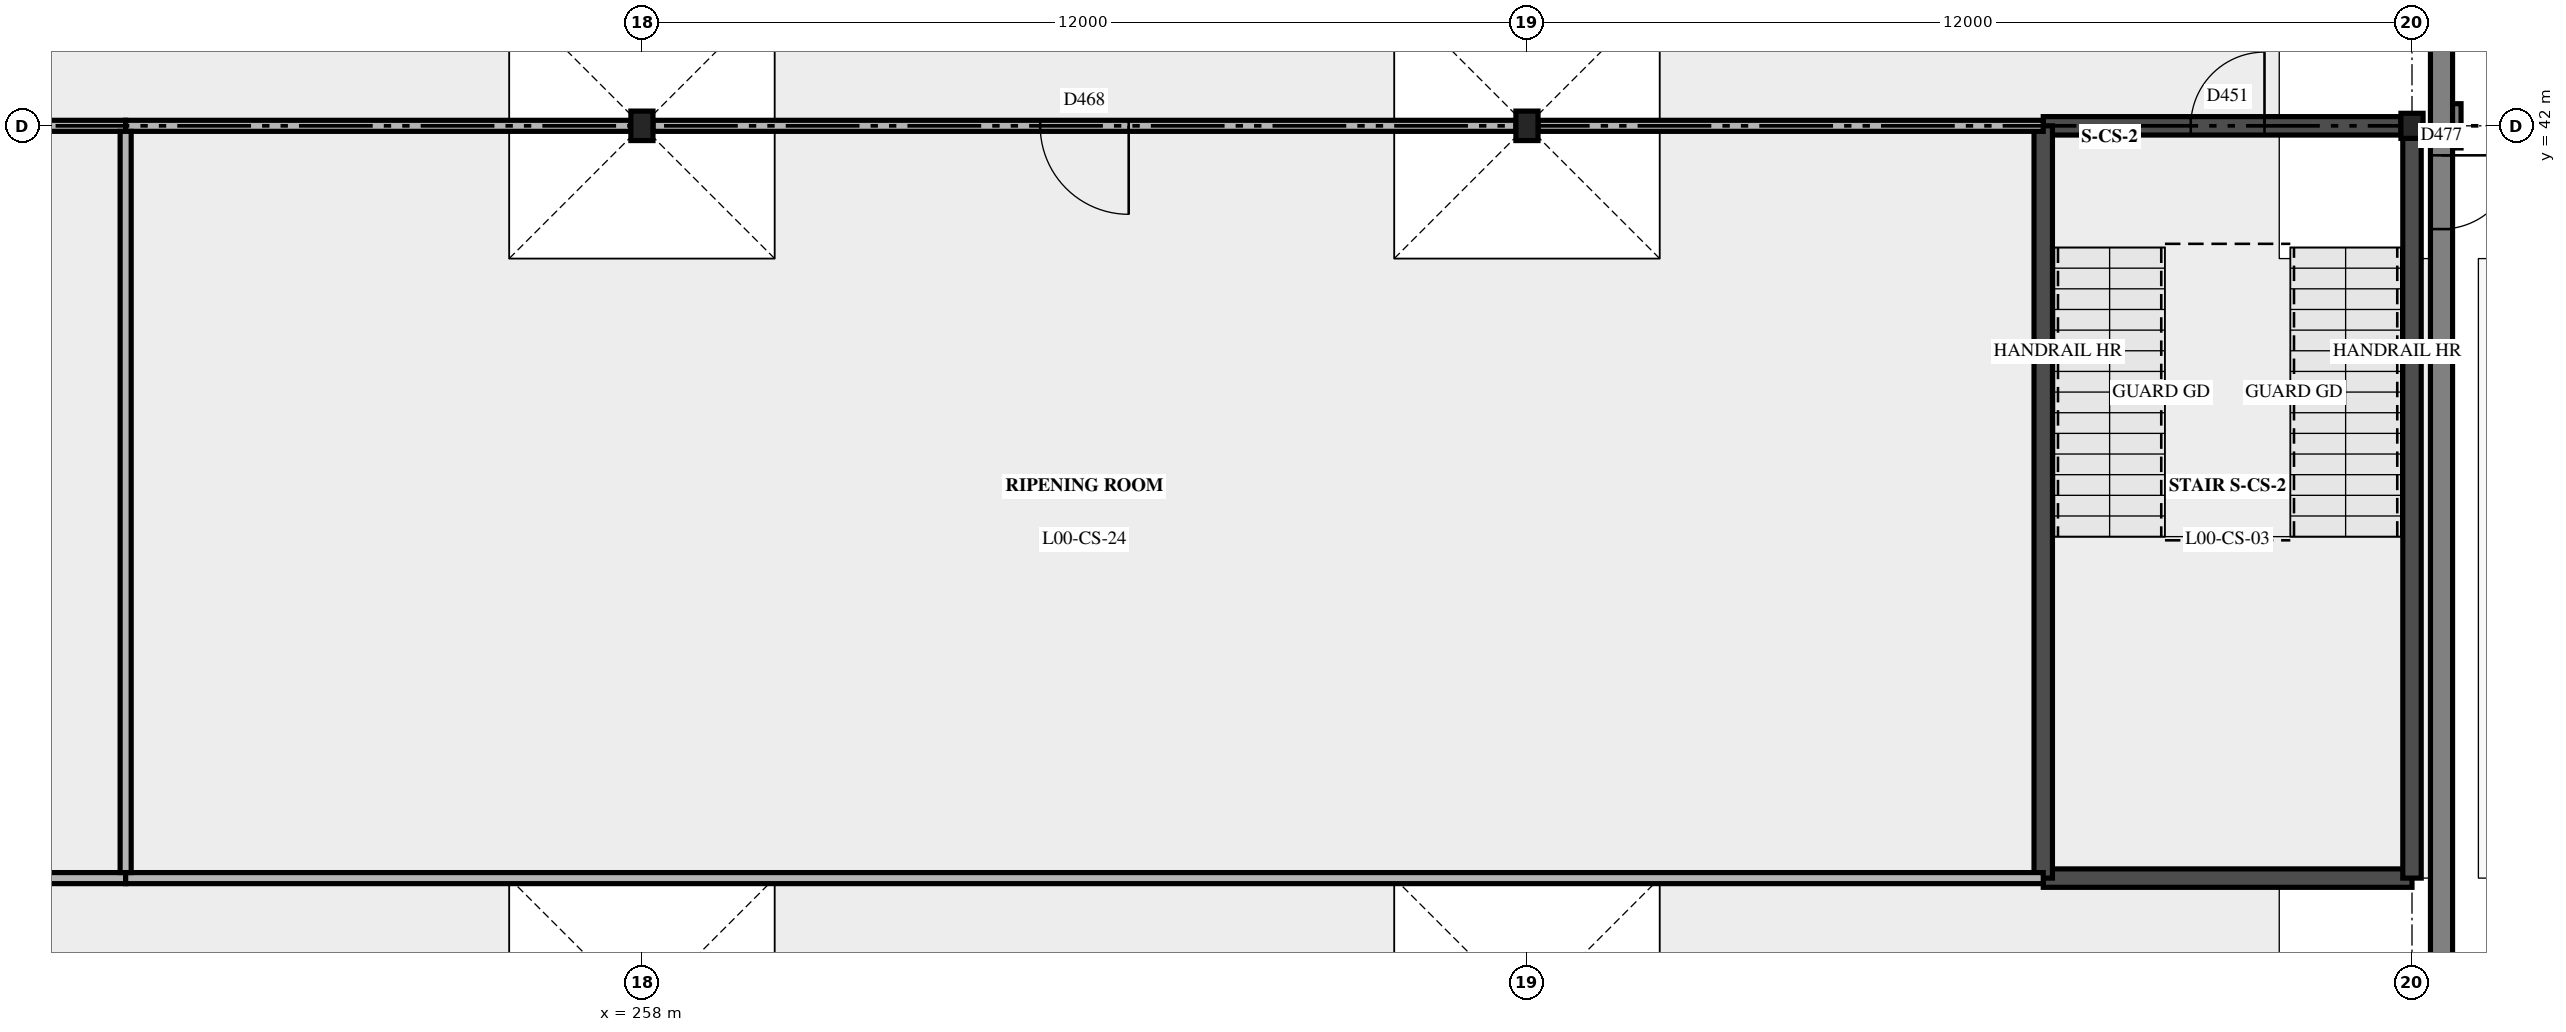
"""IFC4 building model, lengths in metres.
Left out: names, types, materials, properties, quantities, classifications, styles, units other than length and angle.
Written with IfcOpenShell. Run it as: python <this file> out.ifc"""

import sys

from ifc_helpers import new_model, si_unit, direction, frame, frame_2d, origin, origin_2d, place, context, subcontext, project, spatial, polyline, rectangle, i_section, outline, extrude, element, fill, save


model = new_model("IFC4")
c1 = context("Model", 3, precision=1e-05, world=origin(), true_north=direction((0.0, 1.0)))
c2 = subcontext(c1, "Body", "Model", "MODEL_VIEW")
j1 = project(units=[si_unit("LENGTHUNIT", "METRE"), si_unit("PLANEANGLEUNIT", "RADIAN")], contexts=[c1])
p1 = place(None, origin())
s1 = spatial("IfcSite", under=j1, at=p1, CompositionType="ELEMENT")
p2 = place(p1, origin())
s2 = spatial("IfcBuilding", under=s1, at=p2, CompositionType="ELEMENT")
p3 = place(p2, origin())
s3 = spatial("IfcBuildingStorey", under=s2, at=p3, CompositionType="ELEMENT", Elevation=0.0)
for number, where, z_axis, x_axis in (
    (1, (258.0, 42.0, 0.0), (0.0, 0.0, 1.0), (1.0, 0.0, 0.0)),
    (2, (270.0, 42.0, 0.0), (0.0, 0.0, 1.0), (1.0, 0.0, 0.0)),
):
    element("IfcColumn", number, at=place(p3, frame(where, z_axis=z_axis, x_axis=x_axis)), inside=s3, PredefinedType="COLUMN", context=c2, shape_type="SweptSolid", body=[
        extrude(i_section(OverallWidth=0.3, OverallDepth=0.4, WebThickness=0.013, FlangeThickness=0.024, at=origin_2d()), origin(), (0.0, 0.0, 1.0), 5.4),
    ])
p4 = place(p3, frame((282.0, 42.0, 0.0), z_axis=(0.0, 0.0, 1.0), x_axis=(1.0, 0.0, 0.0)))
e3 = element("IfcColumn", 3, at=p4, inside=s3, PredefinedType="COLUMN", context=c2, shape_type="SweptSolid", body=[
    extrude(i_section(OverallWidth=0.3, OverallDepth=0.34, WebThickness=0.012, FlangeThickness=0.021, at=origin_2d()), origin(), (0.0, 0.0, 1.0), 5.4),
])
p5 = place(p3, frame((277.0, 31.8, 0.0), z_axis=(0.0, 0.0, 1.0), x_axis=(1.0, 0.0, 0.0)))
e4 = element("IfcWall", 4, at=p5, inside=s3, PredefinedType="SHEAR", context=c2, shape_type="SweptSolid", body=[
    extrude(rectangle(XDim=5.0, YDim=0.25, at=frame_2d((2.5, 0.0))), origin(), (0.0, 0.0, 1.0), 5.4),
])
p6 = place(p3, frame((282.0, 31.8, 0.0), z_axis=(0.0, 0.0, 1.0), x_axis=(0.0, 1.0, 0.0)))
e5 = element("IfcWall", 5, at=p6, inside=s3, PredefinedType="SHEAR", context=c2, shape_type="SweptSolid", body=[
    extrude(rectangle(XDim=10.03, YDim=0.25, at=frame_2d((5.015, 0.0))), origin(), (0.0, 0.0, 1.0), 5.4),
])
p7 = place(p6, frame((8.8, 0.0, 0.0)))
e6 = element("IfcOpeningElement", 6, at=p7, cuts=e5, PredefinedType="OPENING", context=c2, shape_type="SweptSolid", body=[
    extrude(rectangle(XDim=1.0, YDim=2.1, at=frame_2d((0.5, 1.05))), frame((0.0, 0.135, 0.0), z_axis=(0.0, -1.0, 0.0), x_axis=(1.0, 0.0, 0.0)), (0.0, 0.0, 1.0), 0.27),
])
p8 = place(p3, frame((277.0, 42.0, 0.0), z_axis=(0.0, 0.0, 1.0), x_axis=(1.0, 0.0, 0.0)))
e7 = element("IfcWall", 7, at=p8, inside=s3, PredefinedType="SHEAR", context=c2, shape_type="SweptSolid", body=[
    extrude(rectangle(XDim=4.85, YDim=0.25, at=frame_2d((2.425, 0.0))), origin(), (0.0, 0.0, 1.0), 5.4),
])
p9 = place(p8, frame((2.0, 0.0, 0.0)))
e8 = element("IfcOpeningElement", 8, at=p9, cuts=e7, PredefinedType="OPENING", context=c2, shape_type="SweptSolid", body=[
    extrude(rectangle(XDim=1.0, YDim=2.1, at=frame_2d((0.5, 1.05))), frame((0.0, 0.135, 0.0), z_axis=(0.0, -1.0, 0.0), x_axis=(1.0, 0.0, 0.0)), (0.0, 0.0, 1.0), 0.27),
])
p10 = place(p3, frame((277.0, 31.8, 0.0), z_axis=(0.0, 0.0, 1.0), x_axis=(0.0, 1.0, 0.0)))
e9 = element("IfcWall", 9, at=p10, inside=s3, PredefinedType="SHEAR", context=c2, shape_type="SweptSolid", body=[
    extrude(rectangle(XDim=10.2, YDim=0.25, at=frame_2d((5.1, 0.0))), origin(), (0.0, 0.0, 1.0), 5.4),
])
p11 = place(p3, frame((282.4, 17.75, 0.0), z_axis=(0.0, 0.0, 1.0), x_axis=(0.0, 1.0, 0.0)))
e10 = element("IfcWall", 10, at=p11, inside=s3, PredefinedType="SOLIDWALL", context=c2, shape_type="SweptSolid", body=[
    extrude(rectangle(XDim=48.5, YDim=0.3, at=frame_2d((24.25, 0.0))), origin(), (0.0, 0.0, 1.0), 5.4),
])
p12 = place(p11, frame((11.65, 0.0, 0.0), z_axis=(0.0, 0.0, 1.0), x_axis=(-1.0, 0.0, 0.0)))
e11 = element("IfcOpeningElement", 11, at=p12, cuts=e10, PredefinedType="OPENING", context=c2, shape_type="SweptSolid", body=[
    extrude(rectangle(XDim=1.0, YDim=2.1, at=frame_2d((0.5, 1.05))), frame((0.0, 0.16, 0.0), z_axis=(0.0, -1.0, 0.0), x_axis=(1.0, 0.0, 0.0)), (0.0, 0.0, 1.0), 0.32),
])
p13 = place(p11, frame((23.85, 0.0, 0.0), z_axis=(0.0, 0.0, 1.0), x_axis=(-1.0, 0.0, 0.0)))
e12 = element("IfcOpeningElement", 12, at=p13, cuts=e10, PredefinedType="OPENING", context=c2, shape_type="SweptSolid", body=[
    extrude(rectangle(XDim=1.0, YDim=2.1, at=frame_2d((0.5, 1.05))), frame((0.0, 0.16, 0.0), z_axis=(0.0, -1.0, 0.0), x_axis=(1.0, 0.0, 0.0)), (0.0, 0.0, 1.0), 0.32),
])
p14 = place(p11, frame((9.025, 0.0, 1.8)))
e13 = element("IfcOpeningElement", 13, at=p14, cuts=e10, PredefinedType="OPENING", context=c2, shape_type="SweptSolid", body=[
    extrude(rectangle(XDim=0.45, YDim=2.4, at=frame_2d((0.225, 1.2))), frame((0.0, 0.16, 0.0), z_axis=(0.0, -1.0, 0.0), x_axis=(1.0, 0.0, 0.0)), (0.0, 0.0, 1.0), 0.32),
])
p15 = place(p11, frame((33.025, 0.0, 1.8)))
e14 = element("IfcOpeningElement", 14, at=p15, cuts=e10, PredefinedType="OPENING", context=c2, shape_type="SweptSolid", body=[
    extrude(rectangle(XDim=0.45, YDim=2.4, at=frame_2d((0.225, 1.2))), frame((0.0, 0.16, 0.0), z_axis=(0.0, -1.0, 0.0), x_axis=(1.0, 0.0, 0.0)), (0.0, 0.0, 1.0), 0.32),
])
p16 = place(p11, frame((45.025, 0.0, 1.8)))
e15 = element("IfcOpeningElement", 15, at=p16, cuts=e10, PredefinedType="OPENING", context=c2, shape_type="SweptSolid", body=[
    extrude(rectangle(XDim=0.45, YDim=2.4, at=frame_2d((0.225, 1.2))), frame((0.0, 0.16, 0.0), z_axis=(0.0, -1.0, 0.0), x_axis=(1.0, 0.0, 0.0)), (0.0, 0.0, 1.0), 0.32),
])
p17 = place(p3, frame((282.607, 41.7, 0.0), z_axis=(0.0, 0.0, 1.0), x_axis=(0.0, 1.0, 0.0)))
e16 = element("IfcWall", 16, at=p17, inside=s3, PredefinedType="SOLIDWALL", context=c2, shape_type="SweptSolid", body=[
    extrude(rectangle(XDim=0.6, YDim=0.115, at=frame_2d((0.3, 0.0))), origin(), (0.0, 0.0, 1.0), 5.4),
])
p18 = place(p3, frame((227.0, 31.8, 0.0), z_axis=(0.0, 0.0, 1.0), x_axis=(1.0, 0.0, 0.0)))
e17 = element("IfcWall", 17, at=p18, inside=s3, PredefinedType="PARTITIONING", context=c2, shape_type="SweptSolid", body=[
    extrude(outline(polyline([(0.0, 0.0), (24.0, 0.0), (24.0, 5.15), (23.905, 5.15), (23.9, 4.63), (23.7, 4.63), (23.695, 5.15), (21.505, 5.15), (21.5, 4.63), (21.3, 4.63), (21.295, 5.15), (19.1, 5.15), (19.095, 4.68), (18.905, 4.68), (18.9, 5.15), (16.705, 5.15), (16.7, 4.63), (16.5, 4.63), (16.495, 5.15), (14.305, 5.15), (14.3, 4.63), (14.1, 4.63), (14.095, 5.15), (11.905, 5.15), (11.9, 4.63), (11.7, 4.63), (11.695, 5.15), (9.505, 5.15), (9.5, 4.63), (9.3, 4.63), (9.295, 5.15), (7.1, 5.15), (7.095, 4.68), (6.905, 4.68), (6.9, 5.15), (4.705, 5.15), (4.7, 4.63), (4.5, 4.63), (4.495, 5.15), (2.305, 5.15), (2.3, 4.63), (2.1, 4.63), (2.095, 5.15), (0.0, 5.15), (0.0, 0.0)])), frame((0.0, 0.075, 0.0), z_axis=(0.0, -1.0, 0.0), x_axis=(1.0, 0.0, 0.0)), (0.0, 0.0, 1.0), 0.15),
])
p19 = place(p3, frame((251.0, 31.8, 0.0), z_axis=(0.0, 0.0, 1.0), x_axis=(1.0, 0.0, 0.0)))
e18 = element("IfcWall", 18, at=p19, inside=s3, PredefinedType="PARTITIONING", context=c2, shape_type="SweptSolid", body=[
    extrude(outline(polyline([(0.0, 0.0), (26.0, 0.0), (26.0, 5.15), (23.905, 5.15), (23.9, 4.63), (23.7, 4.63), (23.695, 5.15), (21.505, 5.15), (21.5, 4.63), (21.3, 4.63), (21.295, 5.15), (19.1, 5.15), (19.095, 4.68), (18.905, 4.68), (18.9, 5.15), (16.705, 5.15), (16.7, 4.63), (16.5, 4.63), (16.495, 5.15), (14.305, 5.15), (14.3, 4.63), (14.1, 4.63), (14.095, 5.15), (11.905, 5.15), (11.9, 4.63), (11.7, 4.63), (11.695, 5.15), (9.505, 5.15), (9.5, 4.63), (9.3, 4.63), (9.295, 5.15), (7.1, 5.15), (7.095, 4.68), (6.905, 4.68), (6.9, 5.15), (4.705, 5.15), (4.7, 4.63), (4.5, 4.63), (4.495, 5.15), (2.305, 5.15), (2.3, 4.63), (2.1, 4.63), (2.095, 5.15), (0.0, 5.15), (0.0, 0.0)])), frame((0.0, 0.075, 0.0), z_axis=(0.0, -1.0, 0.0), x_axis=(1.0, 0.0, 0.0)), (0.0, 0.0, 1.0), 0.15),
])
p20 = place(p3, frame((246.15, 42.0, 0.0), z_axis=(0.0, 0.0, 1.0), x_axis=(1.0, 0.0, 0.0)))
e19 = element("IfcWall", 19, at=p20, inside=s3, PredefinedType="PARTITIONING", context=c2, shape_type="SweptSolid", body=[
    extrude(rectangle(XDim=4.85, YDim=0.15, at=frame_2d((2.425, 0.0))), origin(), (0.0, 0.0, 1.0), 4.63),
])
p21 = place(p3, frame((251.0, 42.0, 0.0), z_axis=(0.0, 0.0, 1.0), x_axis=(1.0, 0.0, 0.0)))
e20 = element("IfcWall", 20, at=p21, inside=s3, PredefinedType="PARTITIONING", context=c2, shape_type="SweptSolid", body=[
    extrude(rectangle(XDim=6.85, YDim=0.15, at=frame_2d((3.425, 0.0))), origin(), (0.0, 0.0, 1.0), 4.63),
])
p22 = place(p3, frame((258.15, 42.0, 0.0), z_axis=(0.0, 0.0, 1.0), x_axis=(1.0, 0.0, 0.0)))
e21 = element("IfcWall", 21, at=p22, inside=s3, PredefinedType="PARTITIONING", context=c2, shape_type="SweptSolid", body=[
    extrude(rectangle(XDim=11.7, YDim=0.15, at=frame_2d((5.85, 0.0))), origin(), (0.0, 0.0, 1.0), 4.63),
])
p23 = place(p22, frame((5.25, 0.0, 0.0)))
e22 = element("IfcOpeningElement", 22, at=p23, cuts=e21, PredefinedType="OPENING", context=c2, shape_type="SweptSolid", body=[
    extrude(rectangle(XDim=1.2, YDim=2.4, at=frame_2d((0.6, 1.2))), frame((0.0, 0.085, 0.0), z_axis=(0.0, -1.0, 0.0), x_axis=(1.0, 0.0, 0.0)), (0.0, 0.0, 1.0), 0.17),
])
p24 = place(p3, frame((270.15, 42.0, 0.0), z_axis=(0.0, 0.0, 1.0), x_axis=(1.0, 0.0, 0.0)))
e23 = element("IfcWall", 23, at=p24, inside=s3, PredefinedType="PARTITIONING", context=c2, shape_type="SweptSolid", body=[
    extrude(rectangle(XDim=6.85, YDim=0.15, at=frame_2d((3.425, 0.0))), origin(), (0.0, 0.0, 1.0), 4.63),
])
p25 = place(p3, frame((251.0, 31.875, 0.0), z_axis=(0.0, 0.0, 1.0), x_axis=(0.0, 1.0, 0.0)))
e24 = element("IfcWall", 24, at=p25, inside=s3, PredefinedType="PARTITIONING", context=c2, shape_type="SweptSolid", body=[
    extrude(outline(polyline([(0.0, 0.0), (10.05, 0.0), (10.05, 4.63), (10.025, 4.63), (10.02, 5.15), (0.0, 5.15), (0.0, 0.0)])), frame((0.0, 0.075, 0.0), z_axis=(0.0, -1.0, 0.0), x_axis=(1.0, 0.0, 0.0)), (0.0, 0.0, 1.0), 0.15),
])
p26 = place(p13, origin())
e25 = element("IfcDoor", 25, at=p26, inside=s3, OperationType="SINGLE_SWING_LEFT", PredefinedType="DOOR", context=c2, shape_type="SweptSolid", body=[
    extrude(rectangle(XDim=1.0, YDim=2.1, at=frame_2d((0.5, 1.05))), frame((0.0, 0.025, 0.0), z_axis=(0.0, -1.0, 0.0), x_axis=(1.0, 0.0, 0.0)), (0.0, 0.0, 1.0), 0.05),
])
fill(e12, e25)
p27 = place(p9, origin())
e26 = element("IfcDoor", 26, at=p27, inside=s3, OperationType="SINGLE_SWING_RIGHT", PredefinedType="DOOR", context=c2, shape_type="SweptSolid", body=[
    extrude(rectangle(XDim=1.0, YDim=2.1, at=frame_2d((0.5, 1.05))), frame((0.0, 0.025, 0.0), z_axis=(0.0, -1.0, 0.0), x_axis=(1.0, 0.0, 0.0)), (0.0, 0.0, 1.0), 0.05),
])
fill(e8, e26)
p28 = place(p23, origin())
e27 = element("IfcDoor", 27, at=p28, inside=s3, OperationType="SINGLE_SWING_LEFT", PredefinedType="DOOR", context=c2, shape_type="SweptSolid", body=[
    extrude(rectangle(XDim=1.2, YDim=2.4, at=frame_2d((0.6, 1.2))), frame((0.0, 0.025, 0.0), z_axis=(0.0, -1.0, 0.0), x_axis=(1.0, 0.0, 0.0)), (0.0, 0.0, 1.0), 0.05),
])
fill(e22, e27)
save(model, sys.argv[1])
